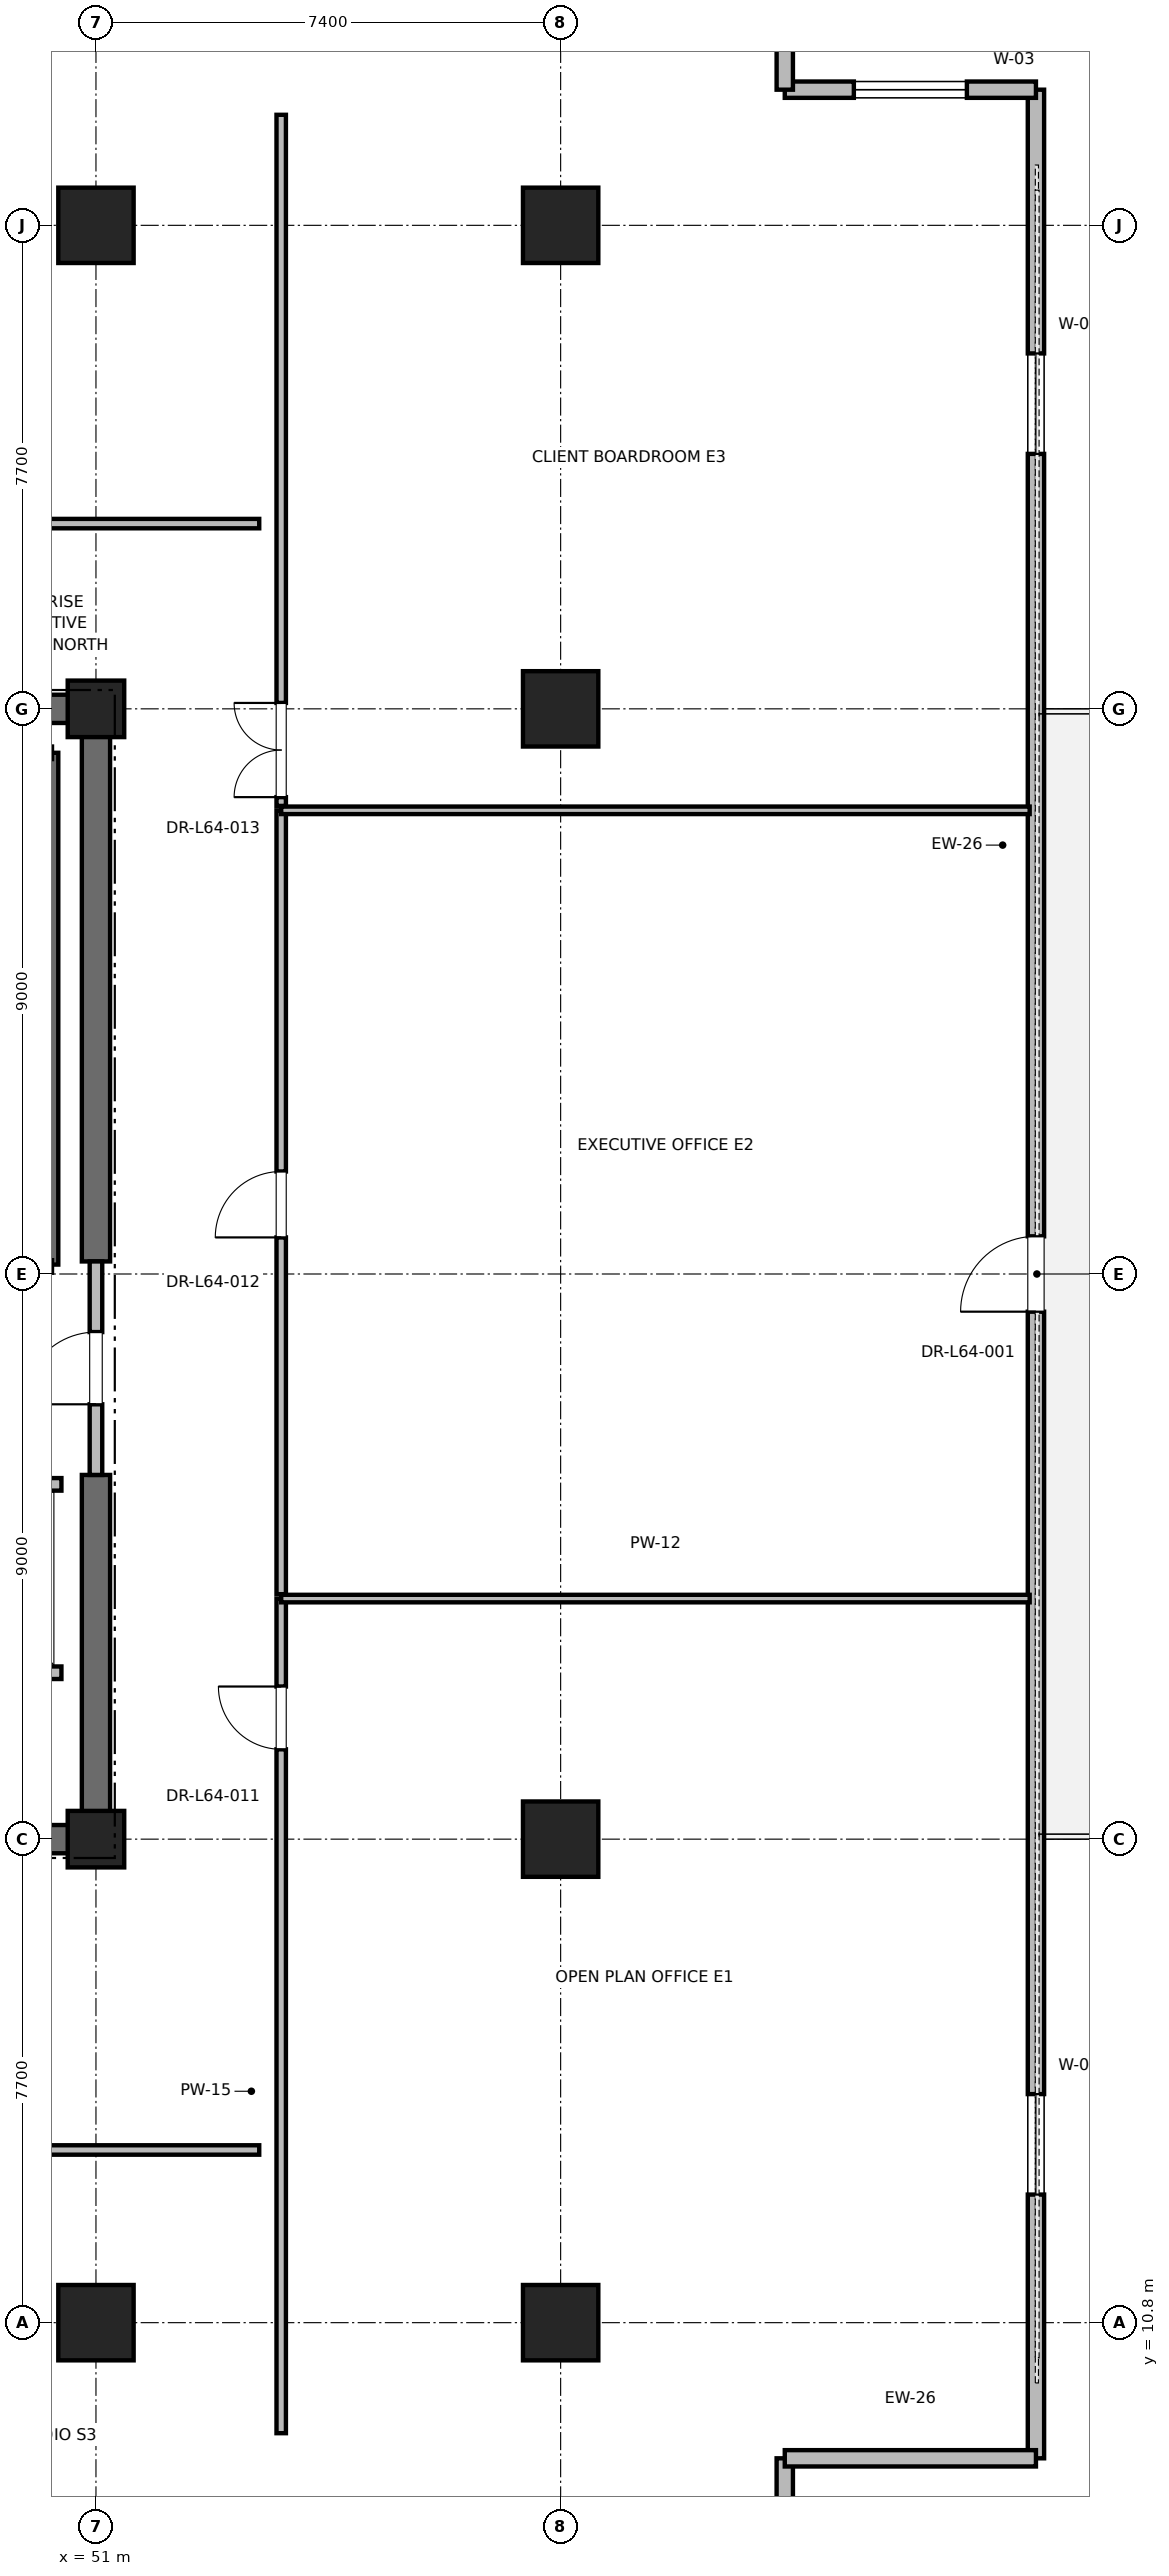
"""IFC4 building model, lengths in metres.
Left out: names, types, materials, properties, quantities, classifications, styles, units other than length and angle.
Written with IfcOpenShell. Run it as: python <this file> out.ifc"""

import sys

from ifc_helpers import new_model, si_unit, direction, frame, frame_2d, origin, origin_2d, place, context, subcontext, project, spatial, rectangle, extrude, element, fill, save


model = new_model("IFC4")
c1 = context("Model", 3, precision=1e-05, world=origin(), true_north=direction((0.0, 1.0)))
c2 = subcontext(c1, "Body", "Model", "MODEL_VIEW")
j1 = project(units=[si_unit("LENGTHUNIT", "METRE"), si_unit("PLANEANGLEUNIT", "RADIAN")], contexts=[c1])
p1 = place(None, origin())
s1 = spatial("IfcSite", under=j1, at=p1, CompositionType="ELEMENT")
p2 = place(p1, origin())
s2 = spatial("IfcBuilding", under=s1, at=p2, CompositionType="ELEMENT")
p3 = place(p2, frame((0.0, 0.0, 275.2)))
s3 = spatial("IfcBuildingStorey", under=s2, at=p3, CompositionType="ELEMENT", Elevation=275.2)
for number, where, z_axis, x_axis in (
    (1, (51.0, 10.8, 0.0), (0.0, 0.0, 1.0), (1.0, 0.0, 0.0)),
    (2, (51.0, 44.2, 0.0), (0.0, 0.0, 1.0), (1.0, 0.0, 0.0)),
    (3, (58.4, 18.5, 0.0), (0.0, 0.0, 1.0), (1.0, 0.0, 0.0)),
    (4, (58.4, 36.5, 0.0), (0.0, 0.0, 1.0), (1.0, 0.0, 0.0)),
    (5, (58.4, 10.8, 0.0), (0.0, 0.0, 1.0), (1.0, 0.0, 0.0)),
    (6, (58.4, 44.2, 0.0), (0.0, 0.0, 1.0), (1.0, 0.0, 0.0)),
):
    element("IfcColumn", number, at=place(p3, frame(where, z_axis=z_axis, x_axis=x_axis)), inside=s3, PredefinedType="COLUMN", context=c2, shape_type="SweptSolid", body=[
        extrude(rectangle(XDim=1.2, YDim=1.2, at=origin_2d()), origin(), (0.0, 0.0, 1.0), 4.0),
    ])
for number, where, z_axis, x_axis in (
    (7, (51.0, 18.5, 0.0), (0.0, 0.0, 1.0), (1.0, 0.0, 0.0)),
    (8, (51.0, 36.5, 0.0), (0.0, 0.0, 1.0), (1.0, 0.0, 0.0)),
):
    element("IfcColumn", number, at=place(p3, frame(where, z_axis=z_axis, x_axis=x_axis)), inside=s3, PredefinedType="PILASTER", context=c2, shape_type="SweptSolid", body=[
        extrude(rectangle(XDim=0.9, YDim=0.9, at=origin_2d()), origin(), (0.0, 0.0, 1.0), 4.0),
    ])
p4 = place(p3, frame((41.8, 18.5, 0.0), z_axis=(0.0, 0.0, 1.0), x_axis=(1.0, 0.0, 0.0)))
e9 = element("IfcWall", 9, at=p4, inside=s3, PredefinedType="SHEAR", context=c2, shape_type="SweptSolid", body=[
    extrude(rectangle(XDim=9.2, YDim=0.45, at=frame_2d((4.6, 0.0))), origin(), (0.0, 0.0, 1.0), 3.785),
])
for number, where, z_axis, x_axis in (
    (10, (45.2, 36.5, 0.0), (0.0, 0.0, 1.0), (1.0, 0.0, 0.0)),
    (11, (51.0, 18.5, 0.0), (0.0, 0.0, 1.0), (0.0, 1.0, 0.0)),
):
    element("IfcWall", number, at=place(p3, frame(where, z_axis=z_axis, x_axis=x_axis)), inside=s3, PredefinedType="SHEAR", context=c2, shape_type="SweptSolid", body=[
        extrude(rectangle(XDim=5.8, YDim=0.45, at=frame_2d((2.9, 0.0))), origin(), (0.0, 0.0, 1.0), 3.785),
    ])
p5 = place(p3, frame((51.0, 27.7, 0.0), z_axis=(0.0, 0.0, 1.0), x_axis=(0.0, 1.0, 0.0)))
e12 = element("IfcWall", 12, at=p5, inside=s3, PredefinedType="SHEAR", context=c2, shape_type="SweptSolid", body=[
    extrude(rectangle(XDim=8.8, YDim=0.45, at=frame_2d((4.4, 0.0))), origin(), (0.0, 0.0, 1.0), 3.785),
])
p6 = place(p3, frame((65.969, 8.64, 0.0), z_axis=(0.0, 0.0, 1.0), x_axis=(0.0, 1.0, 0.0)))
e13 = element("IfcWall", 13, at=p6, inside=s3, PredefinedType="PARAPET", context=c2, shape_type="SweptSolid", body=[
    extrude(rectangle(XDim=37.72, YDim=0.26, at=frame_2d((18.86, 0.0))), origin(), (0.0, 0.0, 1.0), 3.123),
])
p7 = place(p6, frame((4.2, 0.0, 0.85)))
e14 = element("IfcOpeningElement", 14, at=p7, cuts=e13, PredefinedType="OPENING", context=c2, shape_type="SweptSolid", body=[
    extrude(rectangle(XDim=1.6, YDim=2.1, at=frame_2d((0.8, 1.05))), frame((0.0, 0.13, 0.0), z_axis=(0.0, -1.0, 0.0), x_axis=(1.0, 0.0, 0.0)), (0.0, 0.0, 1.0), 0.26),
])
p8 = place(p6, frame((18.26, 0.0, 0.0)))
e15 = element("IfcOpeningElement", 15, at=p8, cuts=e13, PredefinedType="OPENING", context=c2, shape_type="SweptSolid", body=[
    extrude(rectangle(XDim=1.2, YDim=2.2, at=frame_2d((0.6, 1.1))), frame((0.0, 0.13, 0.0), z_axis=(0.0, -1.0, 0.0), x_axis=(1.0, 0.0, 0.0)), (0.0, 0.0, 1.0), 0.26),
])
p9 = place(p6, frame((31.92, 0.0, 0.85)))
e16 = element("IfcOpeningElement", 16, at=p9, cuts=e13, PredefinedType="OPENING", context=c2, shape_type="SweptSolid", body=[
    extrude(rectangle(XDim=1.6, YDim=2.1, at=frame_2d((0.8, 1.05))), frame((0.0, 0.13, 0.0), z_axis=(0.0, -1.0, 0.0), x_axis=(1.0, 0.0, 0.0)), (0.0, 0.0, 1.0), 0.26),
])
p10 = place(p3, frame((61.969, 5.14, 0.0), z_axis=(0.0, 0.0, 1.0), x_axis=(0.0, 1.0, 0.0)))
e17 = element("IfcWall", 17, at=p10, inside=s3, PredefinedType="PARAPET", context=c2, shape_type="SweptSolid", body=[
    extrude(rectangle(XDim=3.5, YDim=0.26, at=frame_2d((1.75, 0.0))), origin(), (0.0, 0.0, 1.0), 3.785),
])
p11 = place(p10, frame((0.85, 0.0, 0.85)))
e18 = element("IfcOpeningElement", 18, at=p11, cuts=e17, PredefinedType="OPENING", context=c2, shape_type="SweptSolid", body=[
    extrude(rectangle(XDim=1.8, YDim=2.2, at=frame_2d((0.9, 1.1))), frame((0.0, 0.13, 0.0), z_axis=(0.0, -1.0, 0.0), x_axis=(1.0, 0.0, 0.0)), (0.0, 0.0, 1.0), 0.26),
])
p12 = place(p3, frame((61.969, 8.64, 0.0), z_axis=(0.0, 0.0, 1.0), x_axis=(1.0, 0.0, 0.0)))
e19 = element("IfcWall", 19, at=p12, inside=s3, PredefinedType="PARAPET", context=c2, shape_type="SweptSolid", body=[
    extrude(rectangle(XDim=4.0, YDim=0.26, at=frame_2d((2.0, 0.0))), origin(), (0.0, 0.0, 1.0), 3.785),
])
p13 = place(p3, frame((65.969, 46.36, 0.0), z_axis=(0.0, 0.0, 1.0), x_axis=(-1.0, 0.0, 0.0)))
e20 = element("IfcWall", 20, at=p13, inside=s3, PredefinedType="PARAPET", context=c2, shape_type="SweptSolid", body=[
    extrude(rectangle(XDim=4.0, YDim=0.26, at=frame_2d((2.0, 0.0))), origin(), (0.0, 0.0, 1.0), 3.785),
])
p14 = place(p13, frame((1.1, 0.0, 0.85)))
e21 = element("IfcOpeningElement", 21, at=p14, cuts=e20, PredefinedType="OPENING", context=c2, shape_type="SweptSolid", body=[
    extrude(rectangle(XDim=1.8, YDim=2.2, at=frame_2d((0.9, 1.1))), frame((0.0, 0.13, 0.0), z_axis=(0.0, -1.0, 0.0), x_axis=(1.0, 0.0, 0.0)), (0.0, 0.0, 1.0), 0.26),
])
p15 = place(p3, frame((61.969, 46.36, 0.0), z_axis=(0.0, 0.0, 1.0), x_axis=(0.0, 1.0, 0.0)))
e22 = element("IfcWall", 22, at=p15, inside=s3, PredefinedType="PARAPET", context=c2, shape_type="SweptSolid", body=[
    extrude(rectangle(XDim=3.5, YDim=0.26, at=frame_2d((1.75, 0.0))), origin(), (0.0, 0.0, 1.0), 3.785),
])
p16 = place(p3, frame((50.3, 27.65, 0.0), z_axis=(0.0, 0.0, 1.0), x_axis=(0.0, 1.0, 0.0)))
e23 = element("IfcWall", 23, at=p16, inside=s3, PredefinedType="SOLIDWALL", context=c2, shape_type="SweptSolid", body=[
    extrude(rectangle(XDim=8.15, YDim=0.2, at=frame_2d((4.075, 0.0))), origin(), (0.0, 0.0, 1.0), 3.785),
])
p17 = place(p3, frame((51.0, 24.3, 0.0), z_axis=(0.0, 0.0, 1.0), x_axis=(0.0, 1.0, 0.0)))
e24 = element("IfcWall", 24, at=p17, inside=s3, PredefinedType="PARTITIONING", context=c2, shape_type="SweptSolid", body=[
    extrude(rectangle(XDim=3.4, YDim=0.2, at=frame_2d((1.7, 0.0))), origin(), (0.0, 0.0, 1.0), 2.865),
])
p18 = place(p17, frame((1.125, 0.0, 0.0)))
e25 = element("IfcOpeningElement", 25, at=p18, cuts=e24, PredefinedType="OPENING", context=c2, shape_type="SweptSolid", body=[
    extrude(rectangle(XDim=1.15, YDim=2.2, at=frame_2d((0.575, 1.1))), frame((0.0, 0.1, 0.0), z_axis=(0.0, -1.0, 0.0), x_axis=(1.0, 0.0, 0.0)), (0.0, 0.0, 1.0), 0.2),
])
p19 = place(p3, frame((47.85, 21.15, 0.0), z_axis=(0.0, 0.0, 1.0), x_axis=(1.0, 0.0, 0.0)))
e26 = element("IfcWall", 26, at=p19, inside=s3, PredefinedType="SOLIDWALL", context=c2, shape_type="SweptSolid", body=[
    extrude(rectangle(XDim=2.6, YDim=0.2, at=frame_2d((1.3, 0.0))), origin(), (0.0, 0.0, 1.0), 3.785),
])
p20 = place(p3, frame((50.45, 24.15, 0.0), z_axis=(0.0, 0.0, 1.0), x_axis=(-1.0, 0.0, 0.0)))
e27 = element("IfcWall", 27, at=p20, inside=s3, PredefinedType="SOLIDWALL", context=c2, shape_type="SweptSolid", body=[
    extrude(rectangle(XDim=2.6, YDim=0.2, at=frame_2d((1.3, 0.0))), origin(), (0.0, 0.0, 1.0), 2.865),
])
p21 = place(p20, frame((0.75, 0.0, 0.0)))
e28 = element("IfcOpeningElement", 28, at=p21, cuts=e27, PredefinedType="OPENING", context=c2, shape_type="SweptSolid", body=[
    extrude(rectangle(XDim=1.1, YDim=2.2, at=frame_2d((0.55, 1.1))), frame((0.0, 0.1, 0.0), z_axis=(0.0, -1.0, 0.0), x_axis=(1.0, 0.0, 0.0)), (0.0, 0.0, 1.0), 0.2),
])
p22 = place(p3, frame((37.894, 39.45, 0.0), z_axis=(0.0, 0.0, 1.0), x_axis=(1.0, 0.0, 0.0)))
e29 = element("IfcWall", 29, at=p22, inside=s3, PredefinedType="PARTITIONING", context=c2, shape_type="SweptSolid", body=[
    extrude(rectangle(XDim=15.706, YDim=0.15, at=frame_2d((7.853, 0.0))), origin(), (0.0, 0.0, 1.0), 2.85),
])
p23 = place(p22, frame((7.278, 0.0, 0.0)))
e30 = element("IfcOpeningElement", 30, at=p23, cuts=e29, PredefinedType="OPENING", context=c2, shape_type="SweptSolid", body=[
    extrude(rectangle(XDim=1.05, YDim=2.2, at=frame_2d((0.525, 1.1))), frame((0.0, 0.075, 0.0), z_axis=(0.0, -1.0, 0.0), x_axis=(1.0, 0.0, 0.0)), (0.0, 0.0, 1.0), 0.15),
])
p24 = place(p3, frame((44.15, 13.55, 0.0), z_axis=(0.0, 0.0, 1.0), x_axis=(1.0, 0.0, 0.0)))
e31 = element("IfcWall", 31, at=p24, inside=s3, PredefinedType="PARTITIONING", context=c2, shape_type="SweptSolid", body=[
    extrude(rectangle(XDim=9.45, YDim=0.15, at=frame_2d((4.725, 0.0))), origin(), (0.0, 0.0, 1.0), 2.85),
])
p25 = place(p24, frame((4.175, 0.0, 0.0)))
e32 = element("IfcOpeningElement", 32, at=p25, cuts=e31, PredefinedType="OPENING", context=c2, shape_type="SweptSolid", body=[
    extrude(rectangle(XDim=1.0, YDim=2.15, at=frame_2d((0.5, 1.075))), frame((0.0, 0.075, 0.0), z_axis=(0.0, -1.0, 0.0), x_axis=(1.0, 0.0, 0.0)), (0.0, 0.0, 1.0), 0.15),
])
p26 = place(p3, frame((53.95, 9.04, 0.0), z_axis=(0.0, 0.0, 1.0), x_axis=(0.0, 1.0, 0.0)))
e33 = element("IfcWall", 33, at=p26, inside=s3, PredefinedType="PARTITIONING", context=c2, shape_type="SweptSolid", body=[
    extrude(rectangle(XDim=13.292, YDim=0.15, at=frame_2d((6.646, 0.0))), origin(), (0.0, 0.0, 1.0), 2.85),
])
p27 = place(p26, frame((10.891, 0.0, 0.0)))
e34 = element("IfcOpeningElement", 34, at=p27, cuts=e33, PredefinedType="OPENING", context=c2, shape_type="SweptSolid", body=[
    extrude(rectangle(XDim=1.0, YDim=2.15, at=frame_2d((0.5, 1.075))), frame((0.0, 0.075, 0.0), z_axis=(0.0, -1.0, 0.0), x_axis=(1.0, 0.0, 0.0)), (0.0, 0.0, 1.0), 0.15),
])
p28 = place(p3, frame((53.95, 22.331, 0.0), z_axis=(0.0, 0.0, 1.0), x_axis=(1.0, 0.0, 0.0)))
e35 = element("IfcWall", 35, at=p28, inside=s3, PredefinedType="PARTITIONING", context=c2, shape_type="SweptSolid", body=[
    extrude(rectangle(XDim=11.919, YDim=0.12, at=frame_2d((5.96, 0.0))), origin(), (0.0, 0.0, 1.0), 2.85),
])
p29 = place(p3, frame((53.95, 22.401, 0.0), z_axis=(0.0, 0.0, 1.0), x_axis=(0.0, 1.0, 0.0)))
e36 = element("IfcWall", 36, at=p29, inside=s3, PredefinedType="PARTITIONING", context=c2, shape_type="SweptSolid", body=[
    extrude(rectangle(XDim=12.483, YDim=0.15, at=frame_2d((6.241, 0.0))), origin(), (0.0, 0.0, 1.0), 2.85),
])
p30 = place(p29, frame((5.681, 0.0, 0.0)))
e37 = element("IfcOpeningElement", 37, at=p30, cuts=e36, PredefinedType="OPENING", context=c2, shape_type="SweptSolid", body=[
    extrude(rectangle(XDim=1.05, YDim=2.2, at=frame_2d((0.525, 1.1))), frame((0.0, 0.075, 0.0), z_axis=(0.0, -1.0, 0.0), x_axis=(1.0, 0.0, 0.0)), (0.0, 0.0, 1.0), 0.15),
])
p31 = place(p3, frame((53.95, 34.884, 0.0), z_axis=(0.0, 0.0, 1.0), x_axis=(1.0, 0.0, 0.0)))
e38 = element("IfcWall", 38, at=p31, inside=s3, PredefinedType="PARTITIONING", context=c2, shape_type="SweptSolid", body=[
    extrude(rectangle(XDim=11.919, YDim=0.12, at=frame_2d((5.96, 0.0))), origin(), (0.0, 0.0, 1.0), 2.85),
])
p32 = place(p3, frame((53.95, 34.954, 0.0), z_axis=(0.0, 0.0, 1.0), x_axis=(0.0, 1.0, 0.0)))
e39 = element("IfcWall", 39, at=p32, inside=s3, PredefinedType="PARTITIONING", context=c2, shape_type="SweptSolid", body=[
    extrude(rectangle(XDim=11.006, YDim=0.15, at=frame_2d((5.503, 0.0))), origin(), (0.0, 0.0, 1.0), 2.85),
])
p33 = place(p32, frame((0.14, 0.0, 0.0)))
e40 = element("IfcOpeningElement", 40, at=p33, cuts=e39, PredefinedType="OPENING", context=c2, shape_type="SweptSolid", body=[
    extrude(rectangle(XDim=1.5, YDim=2.25, at=frame_2d((0.75, 1.125))), frame((0.0, 0.075, 0.0), z_axis=(0.0, -1.0, 0.0), x_axis=(1.0, 0.0, 0.0)), (0.0, 0.0, 1.0), 0.15),
])
p34 = place(p7, origin())
e41 = element("IfcWindow", 41, at=p34, inside=s3, PartitioningType="SINGLE_PANEL", PredefinedType="WINDOW", context=c2, shape_type="SweptSolid", body=[
    extrude(rectangle(XDim=1.6, YDim=2.1, at=frame_2d((0.8, 1.05))), frame((0.0, 0.03, 0.0), z_axis=(0.0, -1.0, 0.0), x_axis=(1.0, 0.0, 0.0)), (0.0, 0.0, 1.0), 0.06),
])
fill(e14, e41)
p35 = place(p8, origin())
e42 = element("IfcDoor", 42, at=p35, inside=s3, OperationType="SINGLE_SWING_LEFT", PredefinedType="DOOR", context=c2, shape_type="SweptSolid", body=[
    extrude(rectangle(XDim=1.2, YDim=2.2, at=frame_2d((0.6, 1.1))), frame((0.0, 0.025, 0.0), z_axis=(0.0, -1.0, 0.0), x_axis=(1.0, 0.0, 0.0)), (0.0, 0.0, 1.0), 0.05),
])
fill(e15, e42)
p36 = place(p9, origin())
e43 = element("IfcWindow", 43, at=p36, inside=s3, PartitioningType="SINGLE_PANEL", PredefinedType="WINDOW", context=c2, shape_type="SweptSolid", body=[
    extrude(rectangle(XDim=1.6, YDim=2.1, at=frame_2d((0.8, 1.05))), frame((0.0, 0.03, 0.0), z_axis=(0.0, -1.0, 0.0), x_axis=(1.0, 0.0, 0.0)), (0.0, 0.0, 1.0), 0.06),
])
fill(e16, e43)
p37 = place(p14, origin())
e44 = element("IfcWindow", 44, at=p37, inside=s3, PartitioningType="SINGLE_PANEL", PredefinedType="WINDOW", context=c2, shape_type="SweptSolid", body=[
    extrude(rectangle(XDim=1.8, YDim=2.2, at=frame_2d((0.9, 1.1))), frame((0.0, 0.03, 0.0), z_axis=(0.0, -1.0, 0.0), x_axis=(1.0, 0.0, 0.0)), (0.0, 0.0, 1.0), 0.06),
])
fill(e21, e44)
p38 = place(p18, origin())
e45 = element("IfcDoor", 45, at=p38, inside=s3, OperationType="SINGLE_SWING_LEFT", PredefinedType="DOOR", context=c2, shape_type="SweptSolid", body=[
    extrude(rectangle(XDim=1.15, YDim=2.2, at=frame_2d((0.575, 1.1))), frame((0.0, 0.025, 0.0), z_axis=(0.0, -1.0, 0.0), x_axis=(1.0, 0.0, 0.0)), (0.0, 0.0, 1.0), 0.05),
])
fill(e25, e45)
p39 = place(p27, origin())
e46 = element("IfcDoor", 46, at=p39, inside=s3, OperationType="SINGLE_SWING_RIGHT", PredefinedType="DOOR", context=c2, shape_type="SweptSolid", body=[
    extrude(rectangle(XDim=1.0, YDim=2.15, at=frame_2d((0.5, 1.075))), frame((0.0, 0.025, 0.0), z_axis=(0.0, -1.0, 0.0), x_axis=(1.0, 0.0, 0.0)), (0.0, 0.0, 1.0), 0.05),
])
fill(e34, e46)
p40 = place(p30, origin())
e47 = element("IfcDoor", 47, at=p40, inside=s3, OperationType="SINGLE_SWING_LEFT", PredefinedType="DOOR", context=c2, shape_type="SweptSolid", body=[
    extrude(rectangle(XDim=1.05, YDim=2.2, at=frame_2d((0.525, 1.1))), frame((0.0, 0.025, 0.0), z_axis=(0.0, -1.0, 0.0), x_axis=(1.0, 0.0, 0.0)), (0.0, 0.0, 1.0), 0.05),
])
fill(e37, e47)
p41 = place(p33, origin())
e48 = element("IfcDoor", 48, at=p41, inside=s3, OperationType="DOUBLE_DOOR_SINGLE_SWING", PredefinedType="DOOR", context=c2, shape_type="SweptSolid", body=[
    extrude(rectangle(XDim=1.5, YDim=2.25, at=frame_2d((0.75, 1.125))), frame((0.0, 0.025, 0.0), z_axis=(0.0, -1.0, 0.0), x_axis=(1.0, 0.0, 0.0)), (0.0, 0.0, 1.0), 0.05),
])
fill(e40, e48)
save(model, sys.argv[1])
